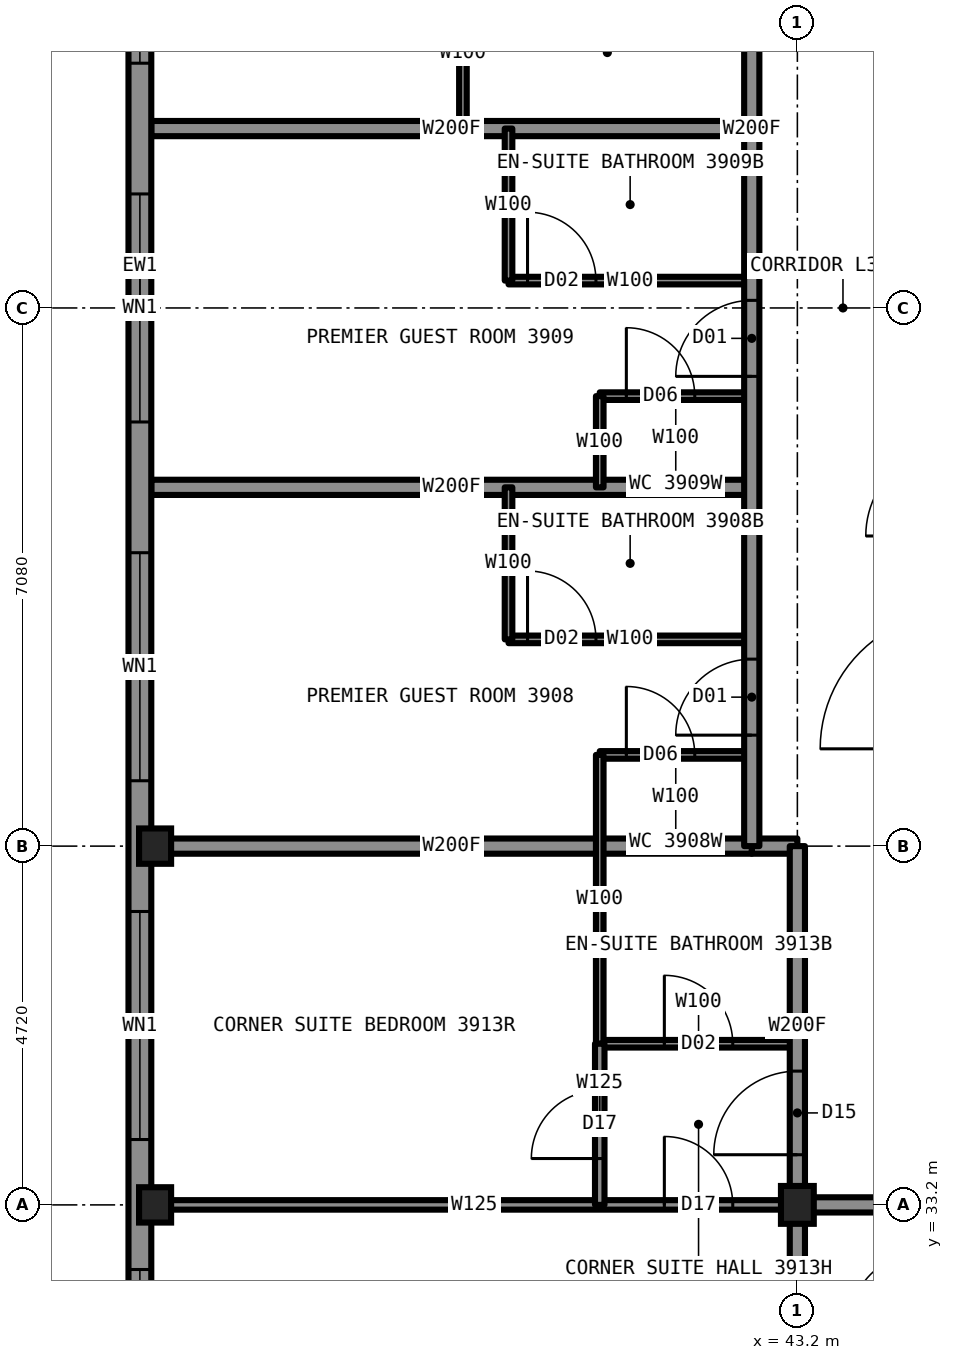
"""IFC4 building model, lengths in metres.
Left out: names, types, materials, properties, quantities, classifications, styles, units other than length and angle.
Written with IfcOpenShell. Run it as: python <this file> out.ifc"""

import sys

from ifc_helpers import new_model, si_unit, direction, frame, frame_2d, origin, origin_2d, place, context, subcontext, project, spatial, rectangle, i_section, extrude, element, fill, save


model = new_model("IFC4")
c1 = context("Model", 3, precision=1e-05, world=origin(), true_north=direction((0.0, 1.0)))
c2 = subcontext(c1, "Body", "Model", "MODEL_VIEW")
j1 = project(units=[si_unit("LENGTHUNIT", "METRE"), si_unit("PLANEANGLEUNIT", "RADIAN")], contexts=[c1])
p1 = place(None, origin())
s1 = spatial("IfcSite", under=j1, at=p1, CompositionType="ELEMENT")
p2 = place(p1, origin())
s2 = spatial("IfcBuilding", under=s1, at=p2, CompositionType="ELEMENT")
p3 = place(p2, frame((0.0, 0.0, 145.9)))
s3 = spatial("IfcBuildingStorey", under=s2, at=p3, CompositionType="ELEMENT", Elevation=145.9)
for number, where, z_axis, x_axis in (
    (1, (34.75, 33.2, 0.0), (0.0, 0.0, 1.0), (1.0, 0.0, 0.0)),
    (2, (34.75, 37.92, 0.0), (0.0, 0.0, 1.0), (1.0, 0.0, 0.0)),
):
    element("IfcColumn", number, at=place(p3, frame(where, z_axis=z_axis, x_axis=x_axis)), inside=s3, PredefinedType="COLUMN", context=c2, shape_type="SweptSolid", body=[
        extrude(i_section(OverallWidth=0.422, OverallDepth=0.465, WebThickness=0.045, FlangeThickness=0.073, at=origin_2d()), origin(), (0.0, 0.0, 1.0), 3.5),
    ])
p4 = place(p3, frame((43.2, 33.2, 0.0), z_axis=(0.0, 0.0, 1.0), x_axis=(1.0, 0.0, 0.0)))
e3 = element("IfcColumn", 3, at=p4, inside=s3, PredefinedType="COLUMN", context=c2, shape_type="SweptSolid", body=[
    extrude(i_section(OverallWidth=0.432, OverallDepth=0.498, WebThickness=0.056, FlangeThickness=0.089, at=origin_2d()), origin(), (0.0, 0.0, 1.0), 3.5),
])
p5 = place(p3, frame((40.6, 43.84, 0.0), z_axis=(0.0, 0.0, 1.0), x_axis=(1.0, 0.0, 0.0)))
e4 = element("IfcWall", 4, at=p5, inside=s3, PredefinedType="PARTITIONING", context=c2, shape_type="SweptSolid", body=[
    extrude(rectangle(XDim=2.0, YDim=0.1, at=frame_2d((1.0, 0.0))), origin(), (0.0, 0.0, 1.0), 3.33),
])
p6 = place(p5, frame((0.35, 0.0, 0.0)))
e5 = element("IfcOpeningElement", 5, at=p6, cuts=e4, PredefinedType="OPENING", context=c2, shape_type="SweptSolid", body=[
    extrude(rectangle(XDim=0.9, YDim=2.1, at=frame_2d((0.45, 1.05))), frame((0.0, 0.06, 0.0), z_axis=(0.0, -1.0, 0.0), x_axis=(1.0, 0.0, 0.0)), (0.0, 0.0, 1.0), 0.12),
])
p7 = place(p3, frame((43.2, 33.2, 0.0), z_axis=(0.0, 0.0, 1.0), x_axis=(1.0, 0.0, 0.0)))
e6 = element("IfcWall", 6, at=p7, inside=s3, PredefinedType="PARTITIONING", context=c2, shape_type="SweptSolid", body=[
    extrude(rectangle(XDim=23.6, YDim=0.2, at=frame_2d((11.8, 0.0))), origin(), (0.0, 0.0, 1.0), 3.33),
])
p8 = place(p7, frame((1.85, 0.0, 0.0)))
e7 = element("IfcOpeningElement", 7, at=p8, cuts=e6, PredefinedType="OPENING", context=c2, shape_type="SweptSolid", body=[
    extrude(rectangle(XDim=1.1, YDim=2.2, at=frame_2d((0.55, 1.1))), frame((0.0, 0.11, 0.0), z_axis=(0.0, -1.0, 0.0), x_axis=(1.0, 0.0, 0.0)), (0.0, 0.0, 1.0), 0.22),
])
p9 = place(p7, frame((17.16, 0.0, 0.0)))
e8 = element("IfcOpeningElement", 8, at=p9, cuts=e6, PredefinedType="OPENING", context=c2, shape_type="SweptSolid", body=[
    extrude(rectangle(XDim=1.0, YDim=2.2, at=frame_2d((0.5, 1.1))), frame((0.0, 0.11, 0.0), z_axis=(0.0, -1.0, 0.0), x_axis=(1.0, 0.0, 0.0)), (0.0, 0.0, 1.0), 0.22),
])
p10 = place(p3, frame((34.7, 33.2, 0.0), z_axis=(0.0, 0.0, 1.0), x_axis=(1.0, 0.0, 0.0)))
e9 = element("IfcWall", 9, at=p10, inside=s3, PredefinedType="PARTITIONING", context=c2, shape_type="SweptSolid", body=[
    extrude(rectangle(XDim=8.5, YDim=0.125, at=frame_2d((4.25, 0.0))), origin(), (0.0, 0.0, 1.0), 2.573),
])
p11 = place(p10, frame((6.75, 0.0, 0.0)))
e10 = element("IfcOpeningElement", 10, at=p11, cuts=e9, PredefinedType="OPENING", context=c2, shape_type="SweptSolid", body=[
    extrude(rectangle(XDim=0.9, YDim=2.2, at=frame_2d((0.45, 1.1))), frame((0.0, 0.073, 0.0), z_axis=(0.0, -1.0, 0.0), x_axis=(1.0, 0.0, 0.0)), (0.0, 0.0, 1.0), 0.145),
])
p12 = place(p3, frame((34.7, 42.64, 0.0), z_axis=(0.0, 0.0, 1.0), x_axis=(1.0, 0.0, 0.0)))
e11 = element("IfcWall", 11, at=p12, inside=s3, PredefinedType="PARTITIONING", context=c2, shape_type="SweptSolid", body=[
    extrude(rectangle(XDim=7.9, YDim=0.2, at=frame_2d((3.95, 0.0))), origin(), (0.0, 0.0, 1.0), 2.731),
])
p13 = place(p3, frame((39.4, 40.64, 0.0), z_axis=(0.0, 0.0, 1.0), x_axis=(1.0, 0.0, 0.0)))
e12 = element("IfcWall", 12, at=p13, inside=s3, PredefinedType="PARTITIONING", context=c2, shape_type="SweptSolid", body=[
    extrude(rectangle(XDim=3.2, YDim=0.1, at=frame_2d((1.6, 0.0))), origin(), (0.0, 0.0, 1.0), 3.33),
])
p14 = place(p13, frame((0.25, 0.0, 0.0)))
e13 = element("IfcOpeningElement", 13, at=p14, cuts=e12, PredefinedType="OPENING", context=c2, shape_type="SweptSolid", body=[
    extrude(rectangle(XDim=0.9, YDim=2.1, at=frame_2d((0.45, 1.05))), frame((0.0, 0.06, 0.0), z_axis=(0.0, -1.0, 0.0), x_axis=(1.0, 0.0, 0.0)), (0.0, 0.0, 1.0), 0.12),
])
p15 = place(p3, frame((40.6, 39.12, 0.0), z_axis=(0.0, 0.0, 1.0), x_axis=(1.0, 0.0, 0.0)))
e14 = element("IfcWall", 14, at=p15, inside=s3, PredefinedType="PARTITIONING", context=c2, shape_type="SweptSolid", body=[
    extrude(rectangle(XDim=2.0, YDim=0.1, at=frame_2d((1.0, 0.0))), origin(), (0.0, 0.0, 1.0), 3.33),
])
p16 = place(p15, frame((0.35, 0.0, 0.0)))
e15 = element("IfcOpeningElement", 15, at=p16, cuts=e14, PredefinedType="OPENING", context=c2, shape_type="SweptSolid", body=[
    extrude(rectangle(XDim=0.9, YDim=2.1, at=frame_2d((0.45, 1.05))), frame((0.0, 0.06, 0.0), z_axis=(0.0, -1.0, 0.0), x_axis=(1.0, 0.0, 0.0)), (0.0, 0.0, 1.0), 0.12),
])
p17 = place(p3, frame((42.6, 37.92, 0.0), z_axis=(0.0, 0.0, 1.0), x_axis=(1.0, 0.0, 0.0)))
e16 = element("IfcWall", 16, at=p17, inside=s3, PredefinedType="PARTITIONING", context=c2, shape_type="SweptSolid", body=[
    extrude(rectangle(XDim=0.6, YDim=0.2, at=frame_2d((0.3, 0.0))), origin(), (0.0, 0.0, 1.0), 2.573),
])
p18 = place(p3, frame((34.7, 37.92, 0.0), z_axis=(0.0, 0.0, 1.0), x_axis=(1.0, 0.0, 0.0)))
e17 = element("IfcWall", 17, at=p18, inside=s3, PredefinedType="PARTITIONING", context=c2, shape_type="SweptSolid", body=[
    extrude(rectangle(XDim=7.9, YDim=0.2, at=frame_2d((3.95, 0.0))), origin(), (0.0, 0.0, 1.0), 2.573),
])
p19 = place(p3, frame((40.6, 35.32, 0.0), z_axis=(0.0, 0.0, 1.0), x_axis=(1.0, 0.0, 0.0)))
e18 = element("IfcWall", 18, at=p19, inside=s3, PredefinedType="PARTITIONING", context=c2, shape_type="SweptSolid", body=[
    extrude(rectangle(XDim=2.6, YDim=0.1, at=frame_2d((1.3, 0.0))), origin(), (0.0, 0.0, 1.0), 3.33),
])
p20 = place(p19, frame((0.85, 0.0, 0.0)))
e19 = element("IfcOpeningElement", 19, at=p20, cuts=e18, PredefinedType="OPENING", context=c2, shape_type="SweptSolid", body=[
    extrude(rectangle(XDim=0.9, YDim=2.1, at=frame_2d((0.45, 1.05))), frame((0.0, 0.06, 0.0), z_axis=(0.0, -1.0, 0.0), x_axis=(1.0, 0.0, 0.0)), (0.0, 0.0, 1.0), 0.12),
])
p21 = place(p3, frame((39.4, 45.36, 0.0), z_axis=(0.0, 0.0, 1.0), x_axis=(1.0, 0.0, 0.0)))
e20 = element("IfcWall", 20, at=p21, inside=s3, PredefinedType="PARTITIONING", context=c2, shape_type="SweptSolid", body=[
    extrude(rectangle(XDim=3.2, YDim=0.1, at=frame_2d((1.6, 0.0))), origin(), (0.0, 0.0, 1.0), 3.33),
])
p22 = place(p21, frame((0.25, 0.0, 0.0)))
e21 = element("IfcOpeningElement", 21, at=p22, cuts=e20, PredefinedType="OPENING", context=c2, shape_type="SweptSolid", body=[
    extrude(rectangle(XDim=0.9, YDim=2.1, at=frame_2d((0.45, 1.05))), frame((0.0, 0.06, 0.0), z_axis=(0.0, -1.0, 0.0), x_axis=(1.0, 0.0, 0.0)), (0.0, 0.0, 1.0), 0.12),
])
p23 = place(p3, frame((34.7, 47.36, 0.0), z_axis=(0.0, 0.0, 1.0), x_axis=(1.0, 0.0, 0.0)))
e22 = element("IfcWall", 22, at=p23, inside=s3, PredefinedType="PARTITIONING", context=c2, shape_type="SweptSolid", body=[
    extrude(rectangle(XDim=7.9, YDim=0.2, at=frame_2d((3.95, 0.0))), origin(), (0.0, 0.0, 1.0), 2.731),
])
p24 = place(p3, frame((43.2, 33.2, 0.0), z_axis=(0.0, 0.0, 1.0), x_axis=(0.0, 1.0, 0.0)))
e23 = element("IfcWall", 23, at=p24, inside=s3, PredefinedType="PARTITIONING", context=c2, shape_type="SweptSolid", body=[
    extrude(rectangle(XDim=4.72, YDim=0.2, at=frame_2d((2.36, 0.0))), origin(), (0.0, 0.0, 1.0), 3.33),
])
p25 = place(p24, frame((0.66, 0.0, 0.0)))
e24 = element("IfcOpeningElement", 24, at=p25, cuts=e23, PredefinedType="OPENING", context=c2, shape_type="SweptSolid", body=[
    extrude(rectangle(XDim=1.1, YDim=2.2, at=frame_2d((0.55, 1.1))), frame((0.0, 0.11, 0.0), z_axis=(0.0, -1.0, 0.0), x_axis=(1.0, 0.0, 0.0)), (0.0, 0.0, 1.0), 0.22),
])
p26 = place(p3, frame((43.2, 24.7, 0.0), z_axis=(0.0, 0.0, 1.0), x_axis=(0.0, 1.0, 0.0)))
e25 = element("IfcWall", 25, at=p26, inside=s3, PredefinedType="PARTITIONING", context=c2, shape_type="SweptSolid", body=[
    extrude(rectangle(XDim=8.5, YDim=0.2, at=frame_2d((4.25, 0.0))), origin(), (0.0, 0.0, 1.0), 2.573),
])
p27 = place(p3, frame((42.6, 37.92, 0.0), z_axis=(0.0, 0.0, 1.0), x_axis=(0.0, 1.0, 0.0)))
e26 = element("IfcWall", 26, at=p27, inside=s3, PredefinedType="PARTITIONING", context=c2, shape_type="SweptSolid", body=[
    extrude(rectangle(XDim=14.16, YDim=0.2, at=frame_2d((7.08, 0.0))), origin(), (0.0, 0.0, 1.0), 3.33),
])
p28 = place(p27, frame((1.46, 0.0, 0.0)))
e27 = element("IfcOpeningElement", 27, at=p28, cuts=e26, PredefinedType="OPENING", context=c2, shape_type="SweptSolid", body=[
    extrude(rectangle(XDim=1.0, YDim=2.2, at=frame_2d((0.5, 1.1))), frame((0.0, 0.11, 0.0), z_axis=(0.0, -1.0, 0.0), x_axis=(1.0, 0.0, 0.0)), (0.0, 0.0, 1.0), 0.22),
])
p29 = place(p27, frame((6.18, 0.0, 0.0)))
e28 = element("IfcOpeningElement", 28, at=p29, cuts=e26, PredefinedType="OPENING", context=c2, shape_type="SweptSolid", body=[
    extrude(rectangle(XDim=1.0, YDim=2.2, at=frame_2d((0.5, 1.1))), frame((0.0, 0.11, 0.0), z_axis=(0.0, -1.0, 0.0), x_axis=(1.0, 0.0, 0.0)), (0.0, 0.0, 1.0), 0.22),
])
p30 = place(p27, frame((11.7, 0.0, 0.0)))
e29 = element("IfcOpeningElement", 29, at=p30, cuts=e26, PredefinedType="OPENING", context=c2, shape_type="SweptSolid", body=[
    extrude(rectangle(XDim=1.0, YDim=2.2, at=frame_2d((0.5, 1.1))), frame((0.0, 0.11, 0.0), z_axis=(0.0, -1.0, 0.0), x_axis=(1.0, 0.0, 0.0)), (0.0, 0.0, 1.0), 0.22),
])
p31 = place(p3, frame((40.6, 35.32, 0.0), z_axis=(0.0, 0.0, 1.0), x_axis=(0.0, 1.0, 0.0)))
e30 = element("IfcWall", 30, at=p31, inside=s3, PredefinedType="PARTITIONING", context=c2, shape_type="SweptSolid", body=[
    extrude(rectangle(XDim=3.8, YDim=0.1, at=frame_2d((1.9, 0.0))), origin(), (0.0, 0.0, 1.0), 3.33),
])
p32 = place(p3, frame((40.6, 42.64, 0.0), z_axis=(0.0, 0.0, 1.0), x_axis=(0.0, 1.0, 0.0)))
e31 = element("IfcWall", 31, at=p32, inside=s3, PredefinedType="PARTITIONING", context=c2, shape_type="SweptSolid", body=[
    extrude(rectangle(XDim=1.2, YDim=0.1, at=frame_2d((0.6, 0.0))), origin(), (0.0, 0.0, 1.0), 3.33),
])
p33 = place(p3, frame((40.6, 33.2, 0.0), z_axis=(0.0, 0.0, 1.0), x_axis=(0.0, 1.0, 0.0)))
e32 = element("IfcWall", 32, at=p33, inside=s3, PredefinedType="PARTITIONING", context=c2, shape_type="SweptSolid", body=[
    extrude(rectangle(XDim=2.12, YDim=0.125, at=frame_2d((1.06, 0.0))), origin(), (0.0, 0.0, 1.0), 3.33),
])
p34 = place(p33, frame((0.61, 0.0, 0.0)))
e33 = element("IfcOpeningElement", 33, at=p34, cuts=e32, PredefinedType="OPENING", context=c2, shape_type="SweptSolid", body=[
    extrude(rectangle(XDim=0.9, YDim=2.2, at=frame_2d((0.45, 1.1))), frame((0.0, 0.073, 0.0), z_axis=(0.0, -1.0, 0.0), x_axis=(1.0, 0.0, 0.0)), (0.0, 0.0, 1.0), 0.145),
])
for number, where, z_axis, x_axis in (
    (34, (39.4, 40.64, 0.0), (0.0, 0.0, 1.0), (0.0, 1.0, 0.0)),
    (35, (39.4, 45.36, 0.0), (0.0, 0.0, 1.0), (0.0, 1.0, 0.0)),
    (36, (38.8, 47.36, 0.0), (0.0, 0.0, 1.0), (0.0, 1.0, 0.0)),
):
    element("IfcWall", number, at=place(p3, frame(where, z_axis=z_axis, x_axis=x_axis)), inside=s3, PredefinedType="PARTITIONING", context=c2, shape_type="SweptSolid", body=[
        extrude(rectangle(XDim=2.0, YDim=0.1, at=frame_2d((1.0, 0.0))), origin(), (0.0, 0.0, 1.0), 3.33),
    ])
p35 = place(p3, frame((34.55, 60.1, 0.0), z_axis=(0.0, 0.0, 1.0), x_axis=(0.0, -1.0, 0.0)))
e37 = element("IfcWall", 37, at=p35, inside=s3, PredefinedType="SOLIDWALL", context=c2, shape_type="SweptSolid", body=[
    extrude(rectangle(XDim=30.2, YDim=0.3, at=frame_2d((15.1, 0.0))), origin(), (0.0, 0.0, 1.0), 2.83),
])
p36 = place(p35, frame((1.3, 0.0, 0.8)))
e38 = element("IfcOpeningElement", 38, at=p36, cuts=e37, PredefinedType="OPENING", context=c2, shape_type="SweptSolid", body=[
    extrude(rectangle(XDim=1.1, YDim=1.7, at=frame_2d((0.55, 0.85))), frame((0.0, 0.16, 0.0), z_axis=(0.0, -1.0, 0.0), x_axis=(1.0, 0.0, 0.0)), (0.0, 0.0, 1.0), 0.32),
])
p37 = place(p35, frame((4.16, 0.0, 0.5)))
e39 = element("IfcOpeningElement", 39, at=p37, cuts=e37, PredefinedType="OPENING", context=c2, shape_type="SweptSolid", body=[
    extrude(rectangle(XDim=3.0, YDim=2.0, at=frame_2d((1.5, 1.0))), frame((0.0, 0.16, 0.0), z_axis=(0.0, -1.0, 0.0), x_axis=(1.0, 0.0, 0.0)), (0.0, 0.0, 1.0), 0.32),
])
p38 = place(p35, frame((8.88, 0.0, 0.5)))
e40 = element("IfcOpeningElement", 40, at=p38, cuts=e37, PredefinedType="OPENING", context=c2, shape_type="SweptSolid", body=[
    extrude(rectangle(XDim=3.0, YDim=2.0, at=frame_2d((1.5, 1.0))), frame((0.0, 0.16, 0.0), z_axis=(0.0, -1.0, 0.0), x_axis=(1.0, 0.0, 0.0)), (0.0, 0.0, 1.0), 0.32),
])
p39 = place(p35, frame((13.6, 0.0, 0.5)))
e41 = element("IfcOpeningElement", 41, at=p39, cuts=e37, PredefinedType="OPENING", context=c2, shape_type="SweptSolid", body=[
    extrude(rectangle(XDim=3.0, YDim=2.0, at=frame_2d((1.5, 1.0))), frame((0.0, 0.16, 0.0), z_axis=(0.0, -1.0, 0.0), x_axis=(1.0, 0.0, 0.0)), (0.0, 0.0, 1.0), 0.32),
])
p40 = place(p35, frame((18.32, 0.0, 0.5)))
e42 = element("IfcOpeningElement", 42, at=p40, cuts=e37, PredefinedType="OPENING", context=c2, shape_type="SweptSolid", body=[
    extrude(rectangle(XDim=3.0, YDim=2.0, at=frame_2d((1.5, 1.0))), frame((0.0, 0.16, 0.0), z_axis=(0.0, -1.0, 0.0), x_axis=(1.0, 0.0, 0.0)), (0.0, 0.0, 1.0), 0.32),
])
p41 = place(p35, frame((23.04, 0.0, 0.5)))
e43 = element("IfcOpeningElement", 43, at=p41, cuts=e37, PredefinedType="OPENING", context=c2, shape_type="SweptSolid", body=[
    extrude(rectangle(XDim=3.0, YDim=2.0, at=frame_2d((1.5, 1.0))), frame((0.0, 0.16, 0.0), z_axis=(0.0, -1.0, 0.0), x_axis=(1.0, 0.0, 0.0)), (0.0, 0.0, 1.0), 0.32),
])
p42 = place(p35, frame((27.75, 0.0, 0.8)))
e44 = element("IfcOpeningElement", 44, at=p42, cuts=e37, PredefinedType="OPENING", context=c2, shape_type="SweptSolid", body=[
    extrude(rectangle(XDim=1.1, YDim=1.7, at=frame_2d((0.55, 0.85))), frame((0.0, 0.16, 0.0), z_axis=(0.0, -1.0, 0.0), x_axis=(1.0, 0.0, 0.0)), (0.0, 0.0, 1.0), 0.32),
])
p43 = place(p28, origin())
e45 = element("IfcDoor", 45, at=p43, inside=s3, OperationType="SINGLE_SWING_LEFT", PredefinedType="DOOR", context=c2, shape_type="SweptSolid", body=[
    extrude(rectangle(XDim=1.0, YDim=2.2, at=frame_2d((0.5, 1.1))), frame((0.0, 0.025, 0.0), z_axis=(0.0, -1.0, 0.0), x_axis=(1.0, 0.0, 0.0)), (0.0, 0.0, 1.0), 0.05),
])
fill(e27, e45)
p44 = place(p14, origin())
e46 = element("IfcDoor", 46, at=p44, inside=s3, OperationType="SINGLE_SWING_RIGHT", PredefinedType="DOOR", context=c2, shape_type="SweptSolid", body=[
    extrude(rectangle(XDim=0.9, YDim=2.1, at=frame_2d((0.45, 1.05))), frame((0.0, 0.025, 0.0), z_axis=(0.0, -1.0, 0.0), x_axis=(1.0, 0.0, 0.0)), (0.0, 0.0, 1.0), 0.05),
])
fill(e13, e46)
p45 = place(p16, origin())
e47 = element("IfcDoor", 47, at=p45, inside=s3, OperationType="SINGLE_SWING_LEFT", PredefinedType="DOOR", context=c2, shape_type="SweptSolid", body=[
    extrude(rectangle(XDim=0.9, YDim=2.1, at=frame_2d((0.45, 1.05))), frame((0.0, 0.025, 0.0), z_axis=(0.0, -1.0, 0.0), x_axis=(1.0, 0.0, 0.0)), (0.0, 0.0, 1.0), 0.05),
])
fill(e15, e47)
p46 = place(p29, origin())
e48 = element("IfcDoor", 48, at=p46, inside=s3, OperationType="SINGLE_SWING_LEFT", PredefinedType="DOOR", context=c2, shape_type="SweptSolid", body=[
    extrude(rectangle(XDim=1.0, YDim=2.2, at=frame_2d((0.5, 1.1))), frame((0.0, 0.025, 0.0), z_axis=(0.0, -1.0, 0.0), x_axis=(1.0, 0.0, 0.0)), (0.0, 0.0, 1.0), 0.05),
])
fill(e28, e48)
p47 = place(p22, origin())
e49 = element("IfcDoor", 49, at=p47, inside=s3, OperationType="SINGLE_SWING_RIGHT", PredefinedType="DOOR", context=c2, shape_type="SweptSolid", body=[
    extrude(rectangle(XDim=0.9, YDim=2.1, at=frame_2d((0.45, 1.05))), frame((0.0, 0.025, 0.0), z_axis=(0.0, -1.0, 0.0), x_axis=(1.0, 0.0, 0.0)), (0.0, 0.0, 1.0), 0.05),
])
fill(e21, e49)
p48 = place(p6, origin())
e50 = element("IfcDoor", 50, at=p48, inside=s3, OperationType="SINGLE_SWING_LEFT", PredefinedType="DOOR", context=c2, shape_type="SweptSolid", body=[
    extrude(rectangle(XDim=0.9, YDim=2.1, at=frame_2d((0.45, 1.05))), frame((0.0, 0.025, 0.0), z_axis=(0.0, -1.0, 0.0), x_axis=(1.0, 0.0, 0.0)), (0.0, 0.0, 1.0), 0.05),
])
fill(e5, e50)
p49 = place(p11, origin())
e51 = element("IfcDoor", 51, at=p49, inside=s3, OperationType="SINGLE_SWING_LEFT", PredefinedType="DOOR", context=c2, shape_type="SweptSolid", body=[
    extrude(rectangle(XDim=0.9, YDim=2.2, at=frame_2d((0.45, 1.1))), frame((0.0, 0.025, 0.0), z_axis=(0.0, -1.0, 0.0), x_axis=(1.0, 0.0, 0.0)), (0.0, 0.0, 1.0), 0.05),
])
fill(e10, e51)
p50 = place(p20, origin())
e52 = element("IfcDoor", 52, at=p50, inside=s3, OperationType="SINGLE_SWING_RIGHT", PredefinedType="DOOR", context=c2, shape_type="SweptSolid", body=[
    extrude(rectangle(XDim=0.9, YDim=2.1, at=frame_2d((0.45, 1.05))), frame((0.0, 0.025, 0.0), z_axis=(0.0, -1.0, 0.0), x_axis=(1.0, 0.0, 0.0)), (0.0, 0.0, 1.0), 0.05),
])
fill(e19, e52)
p51 = place(p25, origin())
e53 = element("IfcDoor", 53, at=p51, inside=s3, OperationType="SINGLE_SWING_LEFT", PredefinedType="DOOR", context=c2, shape_type="SweptSolid", body=[
    extrude(rectangle(XDim=1.1, YDim=2.2, at=frame_2d((0.55, 1.1))), frame((0.0, 0.025, 0.0), z_axis=(0.0, -1.0, 0.0), x_axis=(1.0, 0.0, 0.0)), (0.0, 0.0, 1.0), 0.05),
])
fill(e24, e53)
p52 = place(p34, origin())
e54 = element("IfcDoor", 54, at=p52, inside=s3, OperationType="SINGLE_SWING_LEFT", PredefinedType="DOOR", context=c2, shape_type="SweptSolid", body=[
    extrude(rectangle(XDim=0.9, YDim=2.2, at=frame_2d((0.45, 1.1))), frame((0.0, 0.025, 0.0), z_axis=(0.0, -1.0, 0.0), x_axis=(1.0, 0.0, 0.0)), (0.0, 0.0, 1.0), 0.05),
])
fill(e33, e54)
p53 = place(p38, origin())
e55 = element("IfcWindow", 55, at=p53, inside=s3, PartitioningType="SINGLE_PANEL", PredefinedType="WINDOW", context=c2, shape_type="SweptSolid", body=[
    extrude(rectangle(XDim=3.0, YDim=2.0, at=frame_2d((1.5, 1.0))), frame((0.0, 0.03, 0.0), z_axis=(0.0, -1.0, 0.0), x_axis=(1.0, 0.0, 0.0)), (0.0, 0.0, 1.0), 0.06),
])
fill(e40, e55)
p54 = place(p39, origin())
e56 = element("IfcWindow", 56, at=p54, inside=s3, PartitioningType="SINGLE_PANEL", PredefinedType="WINDOW", context=c2, shape_type="SweptSolid", body=[
    extrude(rectangle(XDim=3.0, YDim=2.0, at=frame_2d((1.5, 1.0))), frame((0.0, 0.03, 0.0), z_axis=(0.0, -1.0, 0.0), x_axis=(1.0, 0.0, 0.0)), (0.0, 0.0, 1.0), 0.06),
])
fill(e41, e56)
p55 = place(p40, origin())
e57 = element("IfcWindow", 57, at=p55, inside=s3, PartitioningType="SINGLE_PANEL", PredefinedType="WINDOW", context=c2, shape_type="SweptSolid", body=[
    extrude(rectangle(XDim=3.0, YDim=2.0, at=frame_2d((1.5, 1.0))), frame((0.0, 0.03, 0.0), z_axis=(0.0, -1.0, 0.0), x_axis=(1.0, 0.0, 0.0)), (0.0, 0.0, 1.0), 0.06),
])
fill(e42, e57)
p56 = place(p41, origin())
e58 = element("IfcWindow", 58, at=p56, inside=s3, PartitioningType="SINGLE_PANEL", PredefinedType="WINDOW", context=c2, shape_type="SweptSolid", body=[
    extrude(rectangle(XDim=3.0, YDim=2.0, at=frame_2d((1.5, 1.0))), frame((0.0, 0.03, 0.0), z_axis=(0.0, -1.0, 0.0), x_axis=(1.0, 0.0, 0.0)), (0.0, 0.0, 1.0), 0.06),
])
fill(e43, e58)
p57 = place(p42, origin())
e59 = element("IfcWindow", 59, at=p57, inside=s3, PartitioningType="SINGLE_PANEL", PredefinedType="WINDOW", context=c2, shape_type="SweptSolid", body=[
    extrude(rectangle(XDim=1.1, YDim=1.7, at=frame_2d((0.55, 0.85))), frame((0.0, 0.03, 0.0), z_axis=(0.0, -1.0, 0.0), x_axis=(1.0, 0.0, 0.0)), (0.0, 0.0, 1.0), 0.06),
])
fill(e44, e59)
save(model, sys.argv[1])
